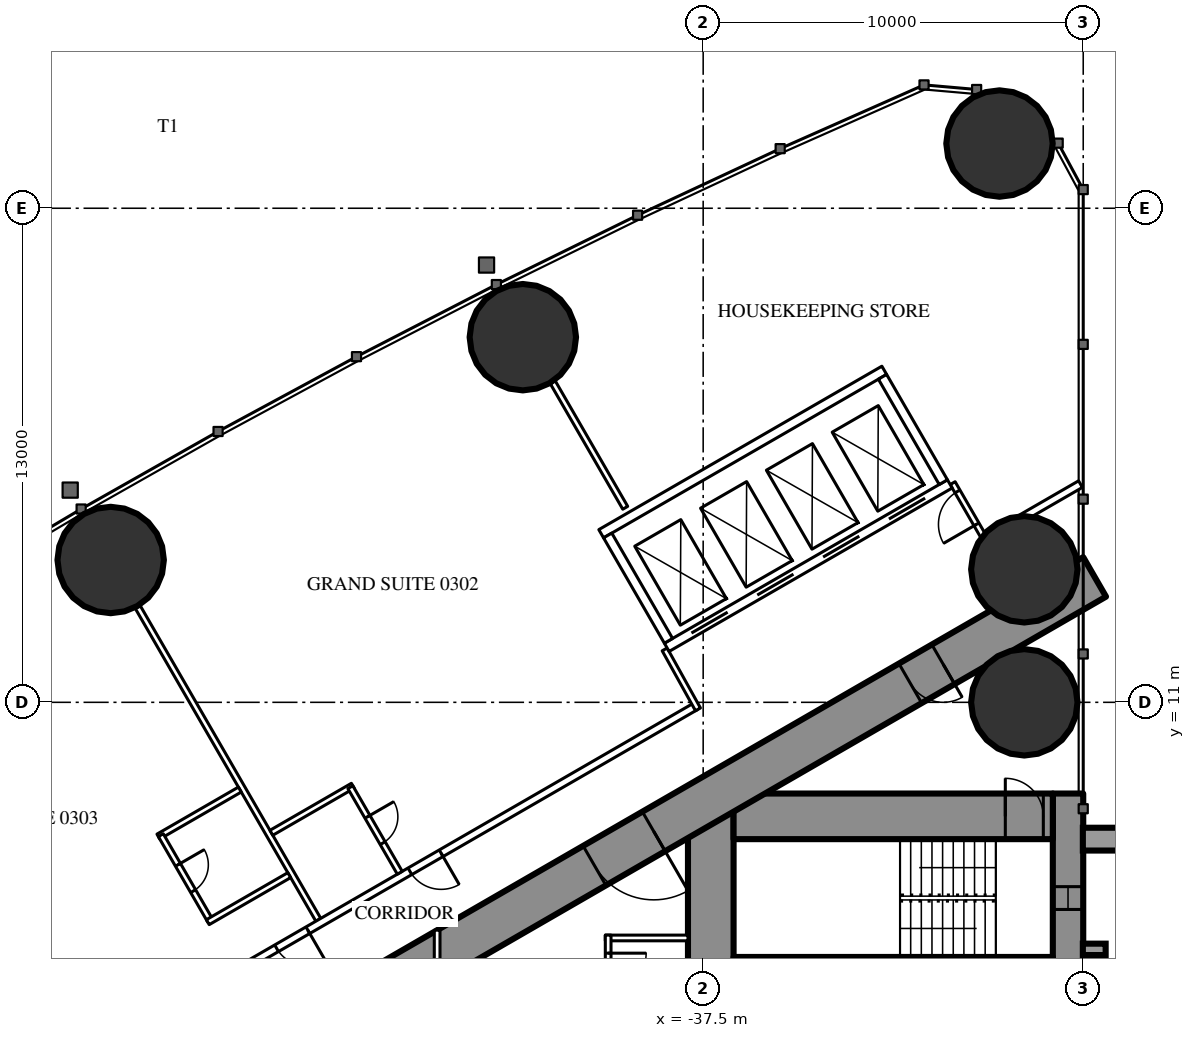
"""IFC4 building model, lengths in metres.
Left out: names, types, materials, properties, quantities, classifications, styles, units other than length and angle.
Written with IfcOpenShell. Run it as: python <this file> out.ifc"""

import sys

from ifc_helpers import new_model, si_unit, direction, frame, frame_2d, origin, origin_2d, place, context, subcontext, project, spatial, rectangle, hollow_circle, extrude, element, fill, save


model = new_model("IFC4")
c1 = context("Model", 3, precision=1e-05, world=origin(), true_north=direction((0.0, 1.0)))
c2 = subcontext(c1, "Body", "Model", "MODEL_VIEW")
j1 = project(units=[si_unit("LENGTHUNIT", "METRE"), si_unit("PLANEANGLEUNIT", "RADIAN")], contexts=[c1])
p1 = place(None, origin())
s1 = spatial("IfcSite", under=j1, at=p1, CompositionType="ELEMENT")
p2 = place(p1, origin())
s2 = spatial("IfcBuilding", under=s1, at=p2, CompositionType="ELEMENT")
p3 = place(p2, frame((0.0, 0.0, 18.0)))
s3 = spatial("IfcBuildingStorey", under=s2, at=p3, CompositionType="ELEMENT", Elevation=18.0)
for number, where, z_axis, x_axis in (
    (1, (-29.703, 25.703, 0.0), (0.0, 0.0, 1.0), (1.0, 0.0, 0.0)),
    (2, (-29.05, 11.0, 0.0), (0.0, 0.0, 1.0), (1.0, 0.0, 0.0)),
    (3, (-29.05, 14.5, 0.0), (0.0, 0.0, 1.0), (1.0, 0.0, 0.0)),
    (4, (-42.245, 20.607, 0.0), (0.0, 0.0, 1.0), (1.0, 0.0, 0.0)),
    (5, (-53.09, 14.745, 0.0), (0.0, 0.0, 1.0), (1.0, 0.0, 0.0)),
):
    element("IfcColumn", number, at=place(p3, frame(where, z_axis=z_axis, x_axis=x_axis)), inside=s3, PredefinedType="COLUMN", context=c2, shape_type="SweptSolid", body=[
        extrude(hollow_circle(Radius=1.4, WallThickness=0.12, at=origin_2d()), origin(), (0.0, 0.0, 1.0), 3.5),
    ])
p4 = place(p3, frame((-27.9, 8.6, 0.0), z_axis=(0.0, 0.0, 1.0), x_axis=(0.0, -1.0, 0.0)))
e6 = element("IfcWall", 6, at=p4, inside=s3, PredefinedType="SHEAR", context=c2, shape_type="SweptSolid", body=[
    extrude(rectangle(XDim=17.2, YDim=0.8, at=frame_2d((8.6, 0.0))), origin(), (0.0, 0.0, 1.0), 3.5),
])
p5 = place(p4, frame((2.45, 0.0, 0.6)))
e7 = element("IfcOpeningElement", 7, at=p5, cuts=e6, PredefinedType="OPENING", context=c2, shape_type="SweptSolid", body=[
    extrude(rectangle(XDim=0.6, YDim=2.1, at=frame_2d((0.3, 1.05))), frame((0.0, 0.41, 0.0), z_axis=(0.0, -1.0, 0.0), x_axis=(1.0, 0.0, 0.0)), (0.0, 0.0, 1.0), 0.82),
])
p6 = place(p4, frame((14.15, 0.0, 0.6)))
e8 = element("IfcOpeningElement", 8, at=p6, cuts=e6, PredefinedType="OPENING", context=c2, shape_type="SweptSolid", body=[
    extrude(rectangle(XDim=0.6, YDim=2.1, at=frame_2d((0.3, 1.05))), frame((0.0, 0.41, 0.0), z_axis=(0.0, -1.0, 0.0), x_axis=(1.0, 0.0, 0.0)), (0.0, 0.0, 1.0), 0.82),
])
p7 = place(p3, frame((-37.3, 8.6, 0.0), z_axis=(0.0, 0.0, 1.0), x_axis=(0.0, -1.0, 0.0)))
e9 = element("IfcWall", 9, at=p7, inside=s3, PredefinedType="SHEAR", context=c2, shape_type="SweptSolid", body=[
    extrude(rectangle(XDim=17.2, YDim=1.2, at=frame_2d((8.6, 0.0))), origin(), (0.0, 0.0, 1.0), 3.5),
])
p8 = place(p7, frame((7.7, 0.0, 0.0)))
e10 = element("IfcOpeningElement", 10, at=p8, cuts=e9, PredefinedType="OPENING", context=c2, shape_type="SweptSolid", body=[
    extrude(rectangle(XDim=1.8, YDim=2.2, at=frame_2d((0.9, 1.1))), frame((0.0, 0.61, 0.0), z_axis=(0.0, -1.0, 0.0), x_axis=(1.0, 0.0, 0.0)), (0.0, 0.0, 1.0), 1.22),
])
p9 = place(p3, frame((-28.3, 8.0, 0.0), z_axis=(0.0, 0.0, 1.0), x_axis=(-1.0, 0.0, 0.0)))
e11 = element("IfcWall", 11, at=p9, inside=s3, PredefinedType="SHEAR", context=c2, shape_type="SweptSolid", body=[
    extrude(rectangle(XDim=8.4, YDim=1.2, at=frame_2d((4.2, 0.0))), origin(), (0.0, 0.0, 1.0), 3.5),
])
p10 = place(p9, frame((0.25, 0.0, 0.0)))
e12 = element("IfcOpeningElement", 12, at=p10, cuts=e11, PredefinedType="OPENING", context=c2, shape_type="SweptSolid", body=[
    extrude(rectangle(XDim=1.0, YDim=2.2, at=frame_2d((0.5, 1.1))), frame((0.0, 0.61, 0.0), z_axis=(0.0, -1.0, 0.0), x_axis=(1.0, 0.0, 0.0)), (0.0, 0.0, 1.0), 1.22),
])
p11 = place(p3, frame((-28.3, 4.15, 0.0), z_axis=(0.0, 0.0, 1.0), x_axis=(-1.0, 0.0, 0.0)))
e13 = element("IfcWall", 13, at=p11, inside=s3, PredefinedType="SHEAR", context=c2, shape_type="SweptSolid", body=[
    extrude(rectangle(XDim=8.4, YDim=0.3, at=frame_2d((4.2, 0.0))), origin(), (0.0, 0.0, 1.0), 3.5),
])
p12 = place(p3, frame((-27.2, 14.3, 0.0), z_axis=(0.0, 0.0, 1.0), x_axis=(-0.866026593062, -0.499997940104, 0.0)))
e14 = element("IfcWall", 14, at=p12, inside=s3, PredefinedType="SHEAR", context=c2, shape_type="SweptSolid", body=[
    extrude(rectangle(XDim=28.946, YDim=1.2, at=frame_2d((14.473, 0.0))), origin(), (0.0, 0.0, 1.0), 3.5),
])
p13 = place(p12, frame((4.6, 0.0, 0.0)))
e15 = element("IfcOpeningElement", 15, at=p13, cuts=e14, PredefinedType="OPENING", context=c2, shape_type="SweptSolid", body=[
    extrude(rectangle(XDim=1.0, YDim=2.2, at=frame_2d((0.5, 1.1))), frame((0.0, 0.61, 0.0), z_axis=(0.0, -1.0, 0.0), x_axis=(1.0, 0.0, 0.0)), (0.0, 0.0, 1.0), 1.22),
])
p14 = place(p12, frame((13.395, 0.0, 0.0)))
e16 = element("IfcOpeningElement", 16, at=p14, cuts=e14, PredefinedType="OPENING", context=c2, shape_type="SweptSolid", body=[
    extrude(rectangle(XDim=1.8, YDim=2.2, at=frame_2d((0.9, 1.1))), frame((0.0, 0.61, 0.0), z_axis=(0.0, -1.0, 0.0), x_axis=(1.0, 0.0, 0.0)), (0.0, 0.0, 1.0), 1.22),
])
p15 = place(p3, frame((-47.627, 5.278, 0.0), z_axis=(0.0, 0.0, 1.0), x_axis=(-0.500009844318, 0.86601972009, 0.0)))
e17 = element("IfcWall", 17, at=p15, inside=s3, PredefinedType="PARTITIONING", context=c2, shape_type="SweptSolid", body=[
    extrude(rectangle(XDim=9.51, YDim=0.15, at=frame_2d((4.755, 0.0))), origin(), (0.0, 0.0, 1.0), 2.25),
])
p16 = place(p3, frame((-39.551, 16.119, 0.0), z_axis=(0.0, 0.0, 1.0), x_axis=(-0.500014214979, 0.866017196607, 0.0)))
e18 = element("IfcWall", 18, at=p16, inside=s3, PredefinedType="PARTITIONING", context=c2, shape_type="SweptSolid", body=[
    extrude(rectangle(XDim=3.815, YDim=0.15, at=frame_2d((1.907, 0.0))), origin(), (0.0, 0.0, 1.0), 3.25),
])
p17 = place(p3, frame((-27.572, 16.741, 0.0), z_axis=(0.0, 0.0, 1.0), x_axis=(-0.866034618596, -0.499984039138, 0.0)))
e19 = element("IfcWall", 19, at=p17, inside=s3, PredefinedType="PARTITIONING", context=c2, shape_type="SweptSolid", body=[
    extrude(rectangle(XDim=2.854, YDim=0.2, at=frame_2d((1.427, 0.0))), origin(), (0.0, 0.0, 1.0), 3.25),
])
p18 = place(p3, frame((-37.7, 10.894, 0.0), z_axis=(0.0, 0.0, 1.0), x_axis=(-0.866027905338, -0.499995667157, 0.0)))
e20 = element("IfcWall", 20, at=p18, inside=s3, PredefinedType="PARTITIONING", context=c2, shape_type="SweptSolid", body=[
    extrude(rectangle(XDim=21.787, YDim=0.2, at=frame_2d((10.894, 0.0))), origin(), (0.0, 0.0, 1.0), 3.25),
])
p19 = place(p18, frame((11.78, 0.0, 0.0)))
e21 = element("IfcOpeningElement", 21, at=p19, cuts=e20, PredefinedType="OPENING", context=c2, shape_type="SweptSolid", body=[
    extrude(rectangle(XDim=0.95, YDim=2.2, at=frame_2d((0.475, 1.1))), frame((0.0, 0.11, 0.0), z_axis=(0.0, -1.0, 0.0), x_axis=(1.0, 0.0, 0.0)), (0.0, 0.0, 1.0), 0.22),
])
p20 = place(p18, frame((7.73, 0.0, 0.0)))
e22 = element("IfcOpeningElement", 22, at=p20, cuts=e20, PredefinedType="OPENING", context=c2, shape_type="SweptSolid", body=[
    extrude(rectangle(XDim=0.95, YDim=2.2, at=frame_2d((0.475, 1.1))), frame((0.0, 0.11, 0.0), z_axis=(0.0, -1.0, 0.0), x_axis=(1.0, 0.0, 0.0)), (0.0, 0.0, 1.0), 0.22),
])
p21 = place(p3, frame((-38.513, 12.392, 0.0), z_axis=(0.0, 0.0, 1.0), x_axis=(0.485585508183, -0.874189175317, 0.0)))
e23 = element("IfcWall", 23, at=p21, inside=s3, PredefinedType="PARTITIONING", context=c2, shape_type="SweptSolid", body=[
    extrude(rectangle(XDim=1.805, YDim=0.15, at=frame_2d((0.902, 0.0))), origin(), (0.0, 0.0, 1.0), 3.25),
])
p22 = place(p3, frame((-30.033, 15.205, 0.0), z_axis=(0.0, 0.0, 1.0), x_axis=(-0.499980071345, 0.866036909293, 0.0)))
e24 = element("IfcWall", 24, at=p22, inside=s3, PredefinedType="PARTITIONING", context=c2, shape_type="SweptSolid", body=[
    extrude(rectangle(XDim=1.805, YDim=0.15, at=frame_2d((0.902, 0.0))), origin(), (0.0, 0.0, 1.0), 3.25),
])
p23 = place(p22, frame((0.552, 0.0, 0.0)))
e25 = element("IfcOpeningElement", 25, at=p23, cuts=e24, PredefinedType="OPENING", context=c2, shape_type="SweptSolid", body=[
    extrude(rectangle(XDim=1.0, YDim=2.2, at=frame_2d((0.5, 1.1))), frame((0.0, 0.085, 0.0), z_axis=(0.0, -1.0, 0.0), x_axis=(1.0, 0.0, 0.0)), (0.0, 0.0, 1.0), 0.17),
])
p24 = place(p3, frame((-49.692, 8.704, 0.0), z_axis=(0.0, 0.0, 1.0), x_axis=(-0.866073894602, -0.499916002032, 0.0)))
e26 = element("IfcWall", 26, at=p24, inside=s3, PredefinedType="PARTITIONING", context=c2, shape_type="SweptSolid", body=[
    extrude(rectangle(XDim=2.475, YDim=0.15, at=frame_2d((1.238, 0.0))), origin(), (0.0, 0.0, 1.0), 3.25),
])
p25 = place(p3, frame((-50.47, 5.253, 0.0), z_axis=(0.0, 0.0, 1.0), x_axis=(-0.500006934395, 0.866021400173, 0.0)))
e27 = element("IfcWall", 27, at=p25, inside=s3, PredefinedType="PARTITIONING", context=c2, shape_type="SweptSolid", body=[
    extrude(rectangle(XDim=2.6, YDim=0.15, at=frame_2d((1.3, 0.0))), origin(), (0.0, 0.0, 1.0), 3.25),
])
p26 = place(p25, frame((0.9, 0.0, 0.0)))
e28 = element("IfcOpeningElement", 28, at=p26, cuts=e27, PredefinedType="OPENING", context=c2, shape_type="SweptSolid", body=[
    extrude(rectangle(XDim=0.8, YDim=2.2, at=frame_2d((0.4, 1.1))), frame((0.0, 0.085, 0.0), z_axis=(0.0, -1.0, 0.0), x_axis=(1.0, 0.0, 0.0)), (0.0, 0.0, 1.0), 0.17),
])
for number, where, z_axis, x_axis in (
    (29, (-48.392, 6.453, 0.0), (0.0, 0.0, 1.0), (-0.866, -0.5, 0.0)),
    (30, (-46.719, 8.804, 0.0), (0.0, 0.0, 1.0), (-0.866, -0.5, 0.0)),
):
    element("IfcWall", number, at=place(p3, frame(where, z_axis=z_axis, x_axis=x_axis)), inside=s3, PredefinedType="PARTITIONING", context=c2, shape_type="SweptSolid", body=[
        extrude(rectangle(XDim=2.475, YDim=0.15, at=frame_2d((1.237, 0.0))), origin(), (0.0, 0.0, 1.0), 3.25),
    ])
p27 = place(p3, frame((-45.483, 6.515, 0.0), z_axis=(0.0, 0.0, 1.0), x_axis=(-0.500006934395, 0.866021400173, 0.0)))
e31 = element("IfcWall", 31, at=p27, inside=s3, PredefinedType="PARTITIONING", context=c2, shape_type="SweptSolid", body=[
    extrude(rectangle(XDim=2.6, YDim=0.15, at=frame_2d((1.3, 0.0))), origin(), (0.0, 0.0, 1.0), 3.25),
])
p28 = place(p27, frame((0.9, 0.0, 0.0)))
e32 = element("IfcOpeningElement", 32, at=p28, cuts=e31, PredefinedType="OPENING", context=c2, shape_type="SweptSolid", body=[
    extrude(rectangle(XDim=0.8, YDim=2.2, at=frame_2d((0.4, 1.1))), frame((0.0, 0.085, 0.0), z_axis=(0.0, -1.0, 0.0), x_axis=(1.0, 0.0, 0.0)), (0.0, 0.0, 1.0), 0.17),
])
p29 = place(p3, frame((-37.9, 4.8, 0.0), z_axis=(0.0, 0.0, 1.0), x_axis=(-1.0, 0.0, 0.0)))
e33 = element("IfcWall", 33, at=p29, inside=s3, PredefinedType="PARTITIONING", context=c2, shape_type="SweptSolid", body=[
    extrude(rectangle(XDim=2.175, YDim=0.15, at=frame_2d((1.087, 0.0))), origin(), (0.0, 0.0, 1.0), 3.25),
])
p30 = place(p3, frame((-40.0, 4.875, 0.0), z_axis=(0.0, 0.0, 1.0), x_axis=(0.0, -1.0, 0.0)))
e34 = element("IfcWall", 34, at=p30, inside=s3, PredefinedType="PARTITIONING", context=c2, shape_type="SweptSolid", body=[
    extrude(rectangle(XDim=1.95, YDim=0.15, at=frame_2d((0.975, 0.0))), origin(), (0.0, 0.0, 1.0), 3.25),
])
p31 = place(p30, frame((0.475, 0.0, 0.0)))
e35 = element("IfcOpeningElement", 35, at=p31, cuts=e34, PredefinedType="OPENING", context=c2, shape_type="SweptSolid", body=[
    extrude(rectangle(XDim=1.0, YDim=2.2, at=frame_2d((0.5, 1.1))), frame((0.0, 0.085, 0.0), z_axis=(0.0, -1.0, 0.0), x_axis=(1.0, 0.0, 0.0)), (0.0, 0.0, 1.0), 0.17),
])
p32 = place(p3, frame((-44.5, 5.005, 0.0), z_axis=(0.0, 0.0, 1.0), x_axis=(0.0, -1.0, 0.0)))
e36 = element("IfcWall", 36, at=p32, inside=s3, PredefinedType="PARTITIONING", context=c2, shape_type="SweptSolid", body=[
    extrude(rectangle(XDim=10.009, YDim=0.15, at=frame_2d((5.005, 0.0))), origin(), (0.0, 0.0, 1.0), 2.35),
])
p33 = place(p32, frame((2.002, 0.0, 0.0)))
e37 = element("IfcOpeningElement", 37, at=p33, cuts=e36, PredefinedType="OPENING", context=c2, shape_type="SweptSolid", body=[
    extrude(rectangle(XDim=1.0, YDim=2.2, at=frame_2d((0.5, 1.1))), frame((0.0, 0.085, 0.0), z_axis=(0.0, -1.0, 0.0), x_axis=(1.0, 0.0, 0.0)), (0.0, 0.0, 1.0), 0.17),
])
p34 = place(p32, frame((7.007, 0.0, 0.0)))
e38 = element("IfcOpeningElement", 38, at=p34, cuts=e36, PredefinedType="OPENING", context=c2, shape_type="SweptSolid", body=[
    extrude(rectangle(XDim=1.0, YDim=2.2, at=frame_2d((0.5, 1.1))), frame((0.0, 0.085, 0.0), z_axis=(0.0, -1.0, 0.0), x_axis=(1.0, 0.0, 0.0)), (0.0, 0.0, 1.0), 0.17),
])
p35 = place(p3, frame((-31.01, 16.747, 0.0), z_axis=(0.0, 0.0, 1.0), x_axis=(-0.866028165386, -0.499995216735, 0.0)))
e39 = element("IfcWall", 39, at=p35, inside=s3, PredefinedType="PARTITIONING", context=c2, shape_type="SweptSolid", body=[
    extrude(rectangle(XDim=8.6, YDim=0.25, at=frame_2d((4.3, 0.0))), origin(), (0.0, 0.0, 1.0), 3.25),
])
p36 = place(p35, frame((0.75, 0.0, 0.0)))
e40 = element("IfcOpeningElement", 40, at=p36, cuts=e39, PredefinedType="OPENING", context=c2, shape_type="SweptSolid", body=[
    extrude(rectangle(XDim=1.1, YDim=2.2, at=frame_2d((0.55, 1.1))), frame((0.0, 0.135, 0.0), z_axis=(0.0, -1.0, 0.0), x_axis=(1.0, 0.0, 0.0)), (0.0, 0.0, 1.0), 0.27),
])
p37 = place(p35, frame((2.75, 0.0, 0.0)))
e41 = element("IfcOpeningElement", 41, at=p37, cuts=e39, PredefinedType="OPENING", context=c2, shape_type="SweptSolid", body=[
    extrude(rectangle(XDim=1.1, YDim=2.2, at=frame_2d((0.55, 1.1))), frame((0.0, 0.135, 0.0), z_axis=(0.0, -1.0, 0.0), x_axis=(1.0, 0.0, 0.0)), (0.0, 0.0, 1.0), 0.27),
])
p38 = place(p35, frame((4.75, 0.0, 0.0)))
e42 = element("IfcOpeningElement", 42, at=p38, cuts=e39, PredefinedType="OPENING", context=c2, shape_type="SweptSolid", body=[
    extrude(rectangle(XDim=1.1, YDim=2.2, at=frame_2d((0.55, 1.1))), frame((0.0, 0.135, 0.0), z_axis=(0.0, -1.0, 0.0), x_axis=(1.0, 0.0, 0.0)), (0.0, 0.0, 1.0), 0.27),
])
p39 = place(p35, frame((6.75, 0.0, 0.0)))
e43 = element("IfcOpeningElement", 43, at=p39, cuts=e39, PredefinedType="OPENING", context=c2, shape_type="SweptSolid", body=[
    extrude(rectangle(XDim=1.1, YDim=2.2, at=frame_2d((0.55, 1.1))), frame((0.0, 0.135, 0.0), z_axis=(0.0, -1.0, 0.0), x_axis=(1.0, 0.0, 0.0)), (0.0, 0.0, 1.0), 0.27),
])
p40 = place(p3, frame((-32.736, 19.736, 0.0), z_axis=(0.0, 0.0, 1.0), x_axis=(-0.866028165386, -0.499995216735, 0.0)))
e44 = element("IfcWall", 44, at=p40, inside=s3, PredefinedType="PARTITIONING", context=c2, shape_type="SweptSolid", body=[
    extrude(rectangle(XDim=8.6, YDim=0.25, at=frame_2d((4.3, 0.0))), origin(), (0.0, 0.0, 1.0), 3.25),
])
p41 = place(p3, frame((-31.181, 16.793, 0.0), z_axis=(0.0, 0.0, 1.0), x_axis=(-0.499929347863, 0.866066190972, 0.0)))
e45 = element("IfcWall", 45, at=p41, inside=s3, PredefinedType="PARTITIONING", context=c2, shape_type="SweptSolid", body=[
    extrude(rectangle(XDim=3.201, YDim=0.25, at=frame_2d((1.6, 0.0))), origin(), (0.0, 0.0, 1.0), 3.25),
])
p42 = place(p3, frame((-38.413, 12.618, 0.0), z_axis=(0.0, 0.0, 1.0), x_axis=(-0.499872130319, 0.866099216793, 0.0)))
e46 = element("IfcWall", 46, at=p42, inside=s3, PredefinedType="PARTITIONING", context=c2, shape_type="SweptSolid", body=[
    extrude(rectangle(XDim=3.2, YDim=0.25, at=frame_2d((1.6, 0.0))), origin(), (0.0, 0.0, 1.0), 3.25),
])
p43 = place(p26, origin())
e47 = element("IfcDoor", 47, at=p43, inside=s3, OperationType="SINGLE_SWING_RIGHT", PredefinedType="DOOR", context=c2, shape_type="SweptSolid", body=[
    extrude(rectangle(XDim=0.8, YDim=2.2, at=frame_2d((0.4, 1.1))), frame((0.0, 0.025, 0.0), z_axis=(0.0, -1.0, 0.0), x_axis=(1.0, 0.0, 0.0)), (0.0, 0.0, 1.0), 0.05),
])
fill(e28, e47)
p44 = place(p19, origin())
e48 = element("IfcDoor", 48, at=p44, inside=s3, OperationType="SINGLE_SWING_LEFT", PredefinedType="DOOR", context=c2, shape_type="SweptSolid", body=[
    extrude(rectangle(XDim=0.95, YDim=2.2, at=frame_2d((0.475, 1.1))), frame((0.0, 0.025, 0.0), z_axis=(0.0, -1.0, 0.0), x_axis=(1.0, 0.0, 0.0)), (0.0, 0.0, 1.0), 0.05),
])
fill(e21, e48)
p45 = place(p28, origin())
e49 = element("IfcDoor", 49, at=p45, inside=s3, OperationType="SINGLE_SWING_RIGHT", PredefinedType="DOOR", context=c2, shape_type="SweptSolid", body=[
    extrude(rectangle(XDim=0.8, YDim=2.2, at=frame_2d((0.4, 1.1))), frame((0.0, 0.025, 0.0), z_axis=(0.0, -1.0, 0.0), x_axis=(1.0, 0.0, 0.0)), (0.0, 0.0, 1.0), 0.05),
])
fill(e32, e49)
p46 = place(p20, origin())
e50 = element("IfcDoor", 50, at=p46, inside=s3, OperationType="SINGLE_SWING_LEFT", PredefinedType="DOOR", context=c2, shape_type="SweptSolid", body=[
    extrude(rectangle(XDim=0.95, YDim=2.2, at=frame_2d((0.475, 1.1))), frame((0.0, 0.025, 0.0), z_axis=(0.0, -1.0, 0.0), x_axis=(1.0, 0.0, 0.0)), (0.0, 0.0, 1.0), 0.05),
])
fill(e22, e50)
p47 = place(p23, origin())
e51 = element("IfcDoor", 51, at=p47, inside=s3, OperationType="SINGLE_SWING_LEFT", PredefinedType="DOOR", context=c2, shape_type="SweptSolid", body=[
    extrude(rectangle(XDim=1.0, YDim=2.2, at=frame_2d((0.5, 1.1))), frame((0.0, 0.025, 0.0), z_axis=(0.0, -1.0, 0.0), x_axis=(1.0, 0.0, 0.0)), (0.0, 0.0, 1.0), 0.05),
])
fill(e25, e51)
p48 = place(p31, origin())
e52 = element("IfcDoor", 52, at=p48, inside=s3, OperationType="SINGLE_SWING_LEFT", PredefinedType="DOOR", context=c2, shape_type="SweptSolid", body=[
    extrude(rectangle(XDim=1.0, YDim=2.2, at=frame_2d((0.5, 1.1))), frame((0.0, 0.025, 0.0), z_axis=(0.0, -1.0, 0.0), x_axis=(1.0, 0.0, 0.0)), (0.0, 0.0, 1.0), 0.05),
])
fill(e35, e52)
p49 = place(p13, origin())
e53 = element("IfcDoor", 53, at=p49, inside=s3, OperationType="SINGLE_SWING_LEFT", PredefinedType="DOOR", context=c2, shape_type="SweptSolid", body=[
    extrude(rectangle(XDim=1.0, YDim=2.2, at=frame_2d((0.5, 1.1))), frame((0.0, 0.025, 0.0), z_axis=(0.0, -1.0, 0.0), x_axis=(1.0, 0.0, 0.0)), (0.0, 0.0, 1.0), 0.05),
])
fill(e15, e53)
p50 = place(p14, origin())
e54 = element("IfcDoor", 54, at=p50, inside=s3, OperationType="DOUBLE_DOOR_SINGLE_SWING", PredefinedType="DOOR", context=c2, shape_type="SweptSolid", body=[
    extrude(rectangle(XDim=1.8, YDim=2.2, at=frame_2d((0.9, 1.1))), frame((0.0, 0.025, 0.0), z_axis=(0.0, -1.0, 0.0), x_axis=(1.0, 0.0, 0.0)), (0.0, 0.0, 1.0), 0.05),
])
fill(e16, e54)
p51 = place(p10, origin())
e55 = element("IfcDoor", 55, at=p51, inside=s3, OperationType="SINGLE_SWING_RIGHT", PredefinedType="DOOR", context=c2, shape_type="SweptSolid", body=[
    extrude(rectangle(XDim=1.0, YDim=2.2, at=frame_2d((0.5, 1.1))), frame((0.0, 0.025, 0.0), z_axis=(0.0, -1.0, 0.0), x_axis=(1.0, 0.0, 0.0)), (0.0, 0.0, 1.0), 0.05),
])
fill(e12, e55)
p52 = place(p36, origin())
e56 = element("IfcDoor", 56, at=p52, inside=s3, OperationType="DOUBLE_DOOR_SLIDING", PredefinedType="USERDEFINED", context=c2, shape_type="SweptSolid", body=[
    extrude(rectangle(XDim=1.1, YDim=2.2, at=frame_2d((0.55, 1.1))), frame((0.0, 0.025, 0.0), z_axis=(0.0, -1.0, 0.0), x_axis=(1.0, 0.0, 0.0)), (0.0, 0.0, 1.0), 0.05),
])
fill(e40, e56)
p53 = place(p37, origin())
e57 = element("IfcDoor", 57, at=p53, inside=s3, OperationType="DOUBLE_DOOR_SLIDING", PredefinedType="USERDEFINED", context=c2, shape_type="SweptSolid", body=[
    extrude(rectangle(XDim=1.1, YDim=2.2, at=frame_2d((0.55, 1.1))), frame((0.0, 0.025, 0.0), z_axis=(0.0, -1.0, 0.0), x_axis=(1.0, 0.0, 0.0)), (0.0, 0.0, 1.0), 0.05),
])
fill(e41, e57)
p54 = place(p38, origin())
e58 = element("IfcDoor", 58, at=p54, inside=s3, OperationType="DOUBLE_DOOR_SLIDING", PredefinedType="USERDEFINED", context=c2, shape_type="SweptSolid", body=[
    extrude(rectangle(XDim=1.1, YDim=2.2, at=frame_2d((0.55, 1.1))), frame((0.0, 0.025, 0.0), z_axis=(0.0, -1.0, 0.0), x_axis=(1.0, 0.0, 0.0)), (0.0, 0.0, 1.0), 0.05),
])
fill(e42, e58)
p55 = place(p39, origin())
e59 = element("IfcDoor", 59, at=p55, inside=s3, OperationType="DOUBLE_DOOR_SLIDING", PredefinedType="USERDEFINED", context=c2, shape_type="SweptSolid", body=[
    extrude(rectangle(XDim=1.1, YDim=2.2, at=frame_2d((0.55, 1.1))), frame((0.0, 0.025, 0.0), z_axis=(0.0, -1.0, 0.0), x_axis=(1.0, 0.0, 0.0)), (0.0, 0.0, 1.0), 0.05),
])
fill(e43, e59)
p56 = place(p5, origin())
e60 = element("IfcWindow", 60, at=p56, inside=s3, PartitioningType="SINGLE_PANEL", PredefinedType="WINDOW", context=c2, shape_type="SweptSolid", body=[
    extrude(rectangle(XDim=0.6, YDim=2.1, at=frame_2d((0.3, 1.05))), frame((0.0, 0.03, 0.0), z_axis=(0.0, -1.0, 0.0), x_axis=(1.0, 0.0, 0.0)), (0.0, 0.0, 1.0), 0.06),
])
fill(e7, e60)
save(model, sys.argv[1])
